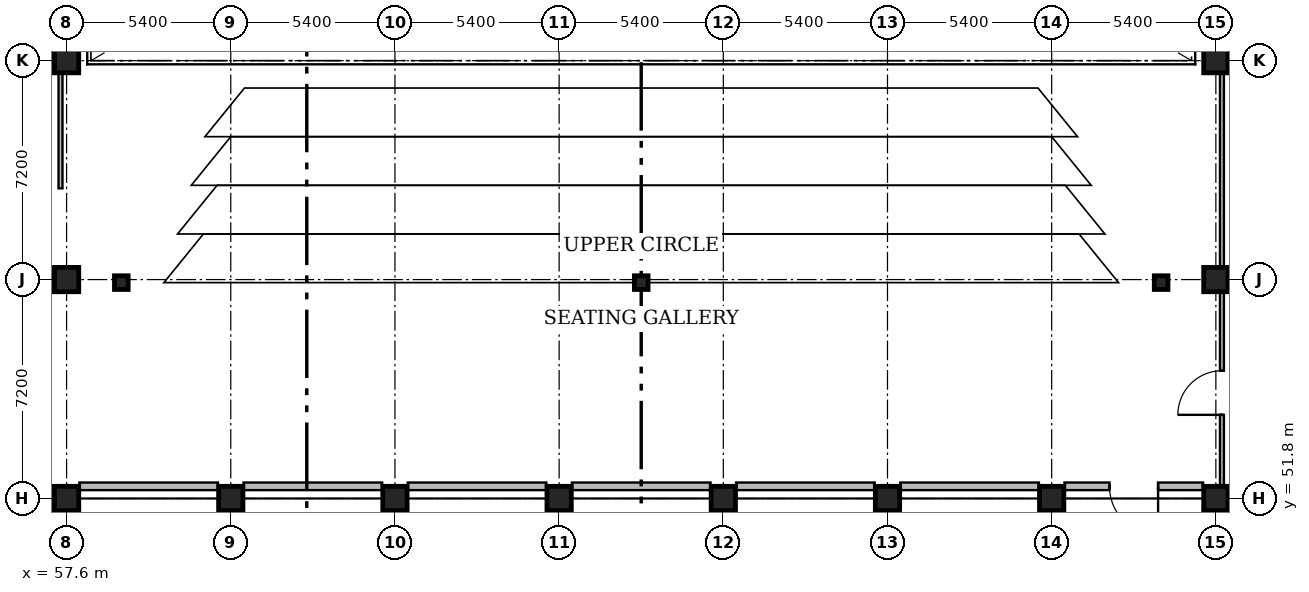
"""IFC4 building model, lengths in metres.
Left out: names, types, materials, properties, quantities, classifications, styles, units other than length and angle.
Written with IfcOpenShell. Run it as: python <this file> out.ifc"""

import sys

from ifc_helpers import new_model, si_unit, direction, frame, frame_2d, origin, origin_2d, place, context, subcontext, project, spatial, rectangle, extrude, element, fill, save


model = new_model("IFC4")
c1 = context("Model", 3, precision=1e-05, world=origin(), true_north=direction((0.0, 1.0)))
c2 = subcontext(c1, "Body", "Model", "MODEL_VIEW")
j1 = project(units=[si_unit("LENGTHUNIT", "METRE"), si_unit("PLANEANGLEUNIT", "RADIAN")], contexts=[c1])
p1 = place(None, origin())
s1 = spatial("IfcSite", under=j1, at=p1, CompositionType="ELEMENT")
p2 = place(p1, origin())
s2 = spatial("IfcBuilding", under=s1, at=p2, CompositionType="ELEMENT")
p3 = place(p2, frame((0.0, 0.0, 9.0)))
s3 = spatial("IfcBuildingStorey", under=s2, at=p3, CompositionType="ELEMENT", Elevation=9.0)
for number, where, z_axis, x_axis in (
    (1, (68.4, 51.8, 0.0), (0.0, 0.0, 1.0), (1.0, 0.0, 0.0)),
    (2, (73.8, 51.8, 0.0), (0.0, 0.0, 1.0), (1.0, 0.0, 0.0)),
    (3, (79.2, 51.8, 0.0), (0.0, 0.0, 1.0), (1.0, 0.0, 0.0)),
    (4, (84.6, 51.8, 0.0), (0.0, 0.0, 1.0), (1.0, 0.0, 0.0)),
    (5, (90.0, 51.8, 0.0), (0.0, 0.0, 1.0), (1.0, 0.0, 0.0)),
    (6, (95.4, 51.8, 0.0), (0.0, 0.0, 1.0), (1.0, 0.0, 0.0)),
    (7, (95.4, 59.0, 0.0), (0.0, 0.0, 1.0), (1.0, 0.0, 0.0)),
    (8, (95.4, 66.2, 0.0), (0.0, 0.0, 1.0), (1.0, 0.0, 0.0)),
    (9, (57.6, 51.8, 0.0), (0.0, 0.0, 1.0), (1.0, 0.0, 0.0)),
    (10, (57.6, 59.0, 0.0), (0.0, 0.0, 1.0), (1.0, 0.0, 0.0)),
    (11, (57.6, 66.2, 0.0), (0.0, 0.0, 1.0), (1.0, 0.0, 0.0)),
    (12, (63.0, 51.8, 0.0), (0.0, 0.0, 1.0), (1.0, 0.0, 0.0)),
):
    element("IfcColumn", number, at=place(p3, frame(where, z_axis=z_axis, x_axis=x_axis)), inside=s3, PredefinedType="COLUMN", context=c2, shape_type="SweptSolid", body=[
        extrude(rectangle(XDim=0.8, YDim=0.8, at=origin_2d()), origin(), (0.0, 0.0, 1.0), 4.2),
    ])
for number, where, z_axis, x_axis in (
    (13, (59.4, 58.9, 0.0), (0.0, 0.0, 1.0), (1.0, 0.0, 0.0)),
    (14, (76.5, 58.9, 0.0), (0.0, 0.0, 1.0), (1.0, 0.0, 0.0)),
    (15, (93.6, 58.9, 0.0), (0.0, 0.0, 1.0), (1.0, 0.0, 0.0)),
):
    element("IfcColumn", number, at=place(p3, frame(where, z_axis=z_axis, x_axis=x_axis)), inside=s3, PredefinedType="COLUMN", context=c2, shape_type="SweptSolid", body=[
        extrude(rectangle(XDim=0.45, YDim=0.45, at=origin_2d()), origin(), (0.0, 0.0, 1.0), 1.05),
    ])
p4 = place(p3, frame((57.76, 49.9, 0.0), z_axis=(0.0, 0.0, 1.0), x_axis=(0.0, 1.0, 0.0)))
e16 = element("IfcWall", 16, at=p4, inside=s3, PredefinedType="SOLIDWALL", context=c2, shape_type="SweptSolid", body=[
    extrude(rectangle(XDim=1.95, YDim=0.28, at=frame_2d((0.975, 0.0))), origin(), (0.0, 0.0, 1.0), 3.573),
])
p5 = place(p3, frame((95.24, 44.5, 0.0), z_axis=(0.0, 0.0, 1.0), x_axis=(0.0, 1.0, 0.0)))
e17 = element("IfcWall", 17, at=p5, inside=s3, PredefinedType="SOLIDWALL", context=c2, shape_type="SweptSolid", body=[
    extrude(rectangle(XDim=7.35, YDim=0.28, at=frame_2d((3.675, 0.0))), origin(), (0.0, 0.0, 1.0), 0.785),
])
p6 = place(p3, frame((94.98, 52.2, 0.0), z_axis=(0.0, 0.0, 1.0), x_axis=(-1.0, 0.0, 0.0)))
e18 = element("IfcWall", 18, at=p6, inside=s3, PredefinedType="PARTITIONING", context=c2, shape_type="SweptSolid", body=[
    extrude(rectangle(XDim=4.56, YDim=0.25, at=frame_2d((2.28, 0.0))), origin(), (0.0, 0.0, 1.0), 3.95),
])
p7 = place(p6, frame((1.48, 0.0, 0.0)))
e19 = element("IfcOpeningElement", 19, at=p7, cuts=e18, PredefinedType="OPENING", context=c2, shape_type="SweptSolid", body=[
    extrude(rectangle(XDim=1.6, YDim=2.25, at=frame_2d((0.8, 1.125))), frame((0.0, 0.145, 0.0), z_axis=(0.0, -1.0, 0.0), x_axis=(1.0, 0.0, 0.0)), (0.0, 0.0, 1.0), 0.29),
])
p8 = place(p3, frame((89.58, 52.2, 0.0), z_axis=(0.0, 0.0, 1.0), x_axis=(-1.0, 0.0, 0.0)))
e20 = element("IfcWall", 20, at=p8, inside=s3, PredefinedType="PARTITIONING", context=c2, shape_type="SweptSolid", body=[
    extrude(rectangle(XDim=4.56, YDim=0.25, at=frame_2d((2.28, 0.0))), origin(), (0.0, 0.0, 1.0), 3.95),
])
p9 = place(p3, frame((84.18, 52.2, 0.0), z_axis=(0.0, 0.0, 1.0), x_axis=(-1.0, 0.0, 0.0)))
e21 = element("IfcWall", 21, at=p9, inside=s3, PredefinedType="PARTITIONING", context=c2, shape_type="SweptSolid", body=[
    extrude(rectangle(XDim=4.56, YDim=0.25, at=frame_2d((2.28, 0.0))), origin(), (0.0, 0.0, 1.0), 3.95),
])
p10 = place(p3, frame((78.78, 52.2, 0.0), z_axis=(0.0, 0.0, 1.0), x_axis=(-1.0, 0.0, 0.0)))
e22 = element("IfcWall", 22, at=p10, inside=s3, PredefinedType="PARTITIONING", context=c2, shape_type="SweptSolid", body=[
    extrude(rectangle(XDim=4.56, YDim=0.25, at=frame_2d((2.28, 0.0))), origin(), (0.0, 0.0, 1.0), 3.95),
])
p11 = place(p3, frame((73.38, 52.2, 0.0), z_axis=(0.0, 0.0, 1.0), x_axis=(-1.0, 0.0, 0.0)))
e23 = element("IfcWall", 23, at=p11, inside=s3, PredefinedType="PARTITIONING", context=c2, shape_type="SweptSolid", body=[
    extrude(rectangle(XDim=4.56, YDim=0.25, at=frame_2d((2.28, 0.0))), origin(), (0.0, 0.0, 1.0), 3.95),
])
for number, where, z_axis, x_axis in (
    (24, (67.98, 52.2, 0.0), (0.0, 0.0, 1.0), (-1.0, 0.0, 0.0)),
    (25, (62.58, 52.2, 0.0), (0.0, 0.0, 1.0), (-1.0, 0.0, 0.0)),
):
    element("IfcWall", number, at=place(p3, frame(where, z_axis=z_axis, x_axis=x_axis)), inside=s3, PredefinedType="PARTITIONING", context=c2, shape_type="SweptSolid", body=[
        extrude(rectangle(XDim=4.56, YDim=0.25, at=frame_2d((2.28, 0.0))), origin(), (0.0, 0.0, 1.0), 3.95),
    ])
p12 = place(p3, frame((57.4, 65.78, 0.0), z_axis=(0.0, 0.0, 1.0), x_axis=(0.0, -1.0, 0.0)))
e26 = element("IfcWall", 26, at=p12, inside=s3, PredefinedType="PARTITIONING", context=c2, shape_type="SweptSolid", body=[
    extrude(rectangle(XDim=3.78, YDim=0.13, at=frame_2d((1.89, 0.0))), origin(), (0.0, 0.0, 1.0), 3.65),
])
p13 = place(p3, frame((95.6, 52.22, 0.0), z_axis=(0.0, 0.0, 1.0), x_axis=(0.0, 1.0, 0.0)))
e27 = element("IfcWall", 27, at=p13, inside=s3, PredefinedType="PARTITIONING", context=c2, shape_type="SweptSolid", body=[
    extrude(rectangle(XDim=6.36, YDim=0.13, at=frame_2d((3.18, 0.0))), origin(), (0.0, 0.0, 1.0), 3.56),
])
p14 = place(p13, frame((2.331, 0.0, 0.0)))
e28 = element("IfcOpeningElement", 28, at=p14, cuts=e27, PredefinedType="OPENING", context=c2, shape_type="SweptSolid", body=[
    extrude(rectangle(XDim=1.45, YDim=2.2, at=frame_2d((0.725, 1.1))), frame((0.0, 0.085, 0.0), z_axis=(0.0, -1.0, 0.0), x_axis=(1.0, 0.0, 0.0)), (0.0, 0.0, 1.0), 0.17),
])
p15 = place(p3, frame((95.6, 59.42, 0.0), z_axis=(0.0, 0.0, 1.0), x_axis=(0.0, 1.0, 0.0)))
e29 = element("IfcWall", 29, at=p15, inside=s3, PredefinedType="PARTITIONING", context=c2, shape_type="SweptSolid", body=[
    extrude(rectangle(XDim=6.36, YDim=0.13, at=frame_2d((3.18, 0.0))), origin(), (0.0, 0.0, 1.0), 3.65),
])
p16 = place(p7, origin())
e30 = element("IfcDoor", 30, at=p16, inside=s3, OperationType="DOUBLE_DOOR_SINGLE_SWING", PredefinedType="DOOR", context=c2, shape_type="SweptSolid", body=[
    extrude(rectangle(XDim=1.6, YDim=2.25, at=frame_2d((0.8, 1.125))), frame((0.0, 0.025, 0.0), z_axis=(0.0, -1.0, 0.0), x_axis=(1.0, 0.0, 0.0)), (0.0, 0.0, 1.0), 0.05),
])
fill(e19, e30)
p17 = place(p14, origin())
e31 = element("IfcDoor", 31, at=p17, inside=s3, OperationType="DOUBLE_DOOR_SINGLE_SWING", PredefinedType="DOOR", context=c2, shape_type="SweptSolid", body=[
    extrude(rectangle(XDim=1.45, YDim=2.2, at=frame_2d((0.725, 1.1))), frame((0.0, 0.025, 0.0), z_axis=(0.0, -1.0, 0.0), x_axis=(1.0, 0.0, 0.0)), (0.0, 0.0, 1.0), 0.05),
])
fill(e28, e31)
save(model, sys.argv[1])
